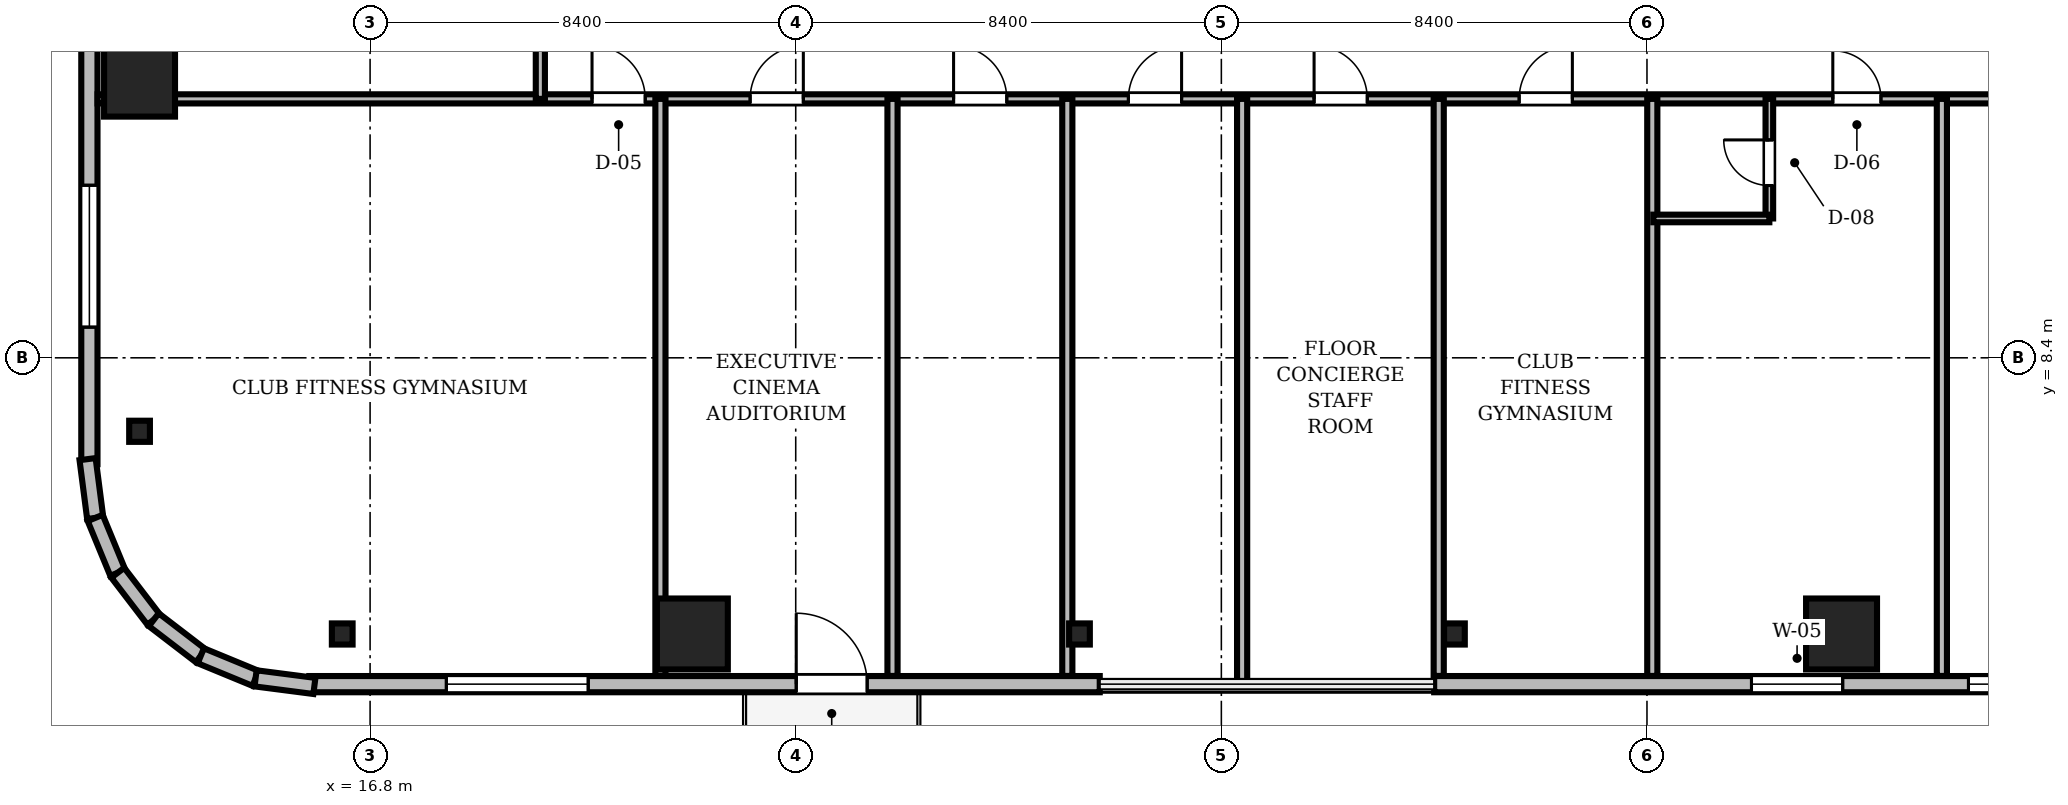
"""IFC4 building model, lengths in metres.
Left out: names, types, materials, properties, quantities, classifications, styles, units other than length and angle.
Written with IfcOpenShell. Run it as: python <this file> out.ifc"""

import sys

from ifc_helpers import new_model, si_unit, direction, frame, frame_2d, origin, origin_2d, place, context, subcontext, project, spatial, rectangle, i_section, extrude, source, transform, mapped, element, fill, save


model = new_model("IFC4")
c1 = context("Model", 3, precision=1e-05, world=origin(), true_north=direction((0.0, 1.0)))
c2 = subcontext(c1, "Body", "Model", "MODEL_VIEW")
j1 = project(units=[si_unit("LENGTHUNIT", "METRE"), si_unit("PLANEANGLEUNIT", "RADIAN")], contexts=[c1])
p1 = place(None, origin())
s1 = spatial("IfcSite", under=j1, at=p1, CompositionType="ELEMENT")
p2 = place(p1, origin())
s2 = spatial("IfcBuilding", under=s1, at=p2, CompositionType="ELEMENT")
p3 = place(p2, frame((0.0, 0.0, 181.0)))
s3 = spatial("IfcBuildingStorey", under=s2, at=p3, CompositionType="ELEMENT", Elevation=181.0)
m1 = source(origin(), c2, "Body", "SweptSolid", [
    extrude(rectangle(XDim=1.4, YDim=1.4, at=origin_2d()), origin(), (0.0, 0.0, 1.0), 3.58),
])
for number, where, z_axis, x_axis in (
    (1, (23.16, 2.95, 0.0), (0.0, 0.0, 1.0), (1.0, 0.0, 0.0)),
    (2, (45.84, 2.95, 0.0), (0.0, 0.0, 1.0), (1.0, 0.0, 0.0)),
    (3, (12.25, 13.86, 0.0), (0.0, 0.0, 1.0), (1.0, 0.0, 0.0)),
):
    element("IfcColumn", number, at=place(p3, frame(where, z_axis=z_axis, x_axis=x_axis)), inside=s3, PredefinedType="COLUMN", context=c2, shape_type="MappedRepresentation", body=[
        mapped(m1, transform((0.0, 0.0, 0.0), scale=1.0)),
    ])
m2 = source(origin(), c2, "Body", "SweptSolid", [
    extrude(i_section(OverallWidth=0.409, OverallDepth=0.417, WebThickness=0.021, FlangeThickness=0.033, FilletRadius=0.015, at=origin_2d()), origin(), (0.0, 0.0, 1.0), 3.58),
])
for number, where, z_axis, x_axis in (
    (4, (16.25, 2.95, 0.0), (0.0, 0.0, 1.0), (1.0, 0.0, 0.0)),
    (5, (30.8, 2.95, 0.0), (0.0, 0.0, 1.0), (1.0, 0.0, 0.0)),
    (6, (38.2, 2.95, 0.0), (0.0, 0.0, 1.0), (1.0, 0.0, 0.0)),
    (7, (12.25, 6.95, 0.0), (0.0, 0.0, 1.0), (1.0, 0.0, 0.0)),
):
    element("IfcColumn", number, at=place(p3, frame(where, z_axis=z_axis, x_axis=x_axis)), inside=s3, PredefinedType="COLUMN", context=c2, shape_type="MappedRepresentation", body=[
        mapped(m2, transform((0.0, 0.0, 0.0), scale=1.0)),
    ])
m3 = source(origin(), c2, "Body", "SweptSolid", [
    extrude(rectangle(XDim=15.6, YDim=0.32, at=frame_2d((7.8, 0.0))), origin(), (0.0, 0.0, 1.0), 3.58),
])
p4 = place(p3, frame((15.6, 1.96, 0.0), z_axis=(0.0, 0.0, 1.0), x_axis=(1.0, 0.0, 0.0)))
e8 = element("IfcWall", 8, at=p4, inside=s3, PredefinedType="SOLIDWALL", context=c2, shape_type="MappedRepresentation", body=[
    mapped(m3, transform((0.0, 0.0, 0.0), scale=1.0)),
])
m4 = source(origin(), c2, "Body", "SweptSolid", [
    extrude(rectangle(XDim=1.4, YDim=2.3, at=frame_2d((0.7, 1.15))), frame((0.0, 0.17, 0.0), z_axis=(0.0, -1.0, 0.0), x_axis=(1.0, 0.0, 0.0)), (0.0, 0.0, 1.0), 0.34),
])
p5 = place(p4, frame((9.61, 0.0, 0.0)))
e9 = element("IfcOpeningElement", 9, at=p5, cuts=e8, PredefinedType="OPENING", context=c2, shape_type="MappedRepresentation", body=[
    mapped(m4, transform((0.0, 0.0, 0.0), scale=1.0)),
])
m5 = source(origin(), c2, "Body", "SweptSolid", [
    extrude(rectangle(XDim=2.8, YDim=2.4, at=frame_2d((1.4, 1.2))), frame((0.0, 0.17, 0.0), z_axis=(0.0, -1.0, 0.0), x_axis=(1.0, 0.0, 0.0)), (0.0, 0.0, 1.0), 0.34),
])
p6 = place(p4, frame((2.705, 0.0, 0.72)))
e10 = element("IfcOpeningElement", 10, at=p6, cuts=e8, PredefinedType="OPENING", context=c2, shape_type="MappedRepresentation", body=[
    mapped(m5, transform((0.0, 0.0, 0.0), scale=1.0)),
])
p7 = place(p3, frame((37.8, 1.96, 0.0), z_axis=(0.0, 0.0, 1.0), x_axis=(1.0, 0.0, 0.0)))
e11 = element("IfcWall", 11, at=p7, inside=s3, PredefinedType="SOLIDWALL", context=c2, shape_type="MappedRepresentation", body=[
    mapped(m3, transform((0.0, 0.0, 0.0), scale=1.0)),
])
p8 = place(p7, frame((10.545, 0.0, 0.72)))
e12 = element("IfcOpeningElement", 12, at=p8, cuts=e11, PredefinedType="OPENING", context=c2, shape_type="MappedRepresentation", body=[
    mapped(m5, transform((0.0, 0.0, 0.0), scale=1.0)),
])
m6 = source(origin(), c2, "Body", "SweptSolid", [
    extrude(rectangle(XDim=1.8, YDim=2.4, at=frame_2d((0.9, 1.2))), frame((0.0, 0.17, 0.0), z_axis=(0.0, -1.0, 0.0), x_axis=(1.0, 0.0, 0.0)), (0.0, 0.0, 1.0), 0.34),
])
p9 = place(p7, frame((6.262, 0.0, 0.72)))
e13 = element("IfcOpeningElement", 13, at=p9, cuts=e11, PredefinedType="OPENING", context=c2, shape_type="MappedRepresentation", body=[
    mapped(m6, transform((0.0, 0.0, 0.0), scale=1.0)),
])
p10 = place(p3, frame((11.26, 21.9, 0.0), z_axis=(0.0, 0.0, 1.0), x_axis=(0.0, -1.0, 0.0)))
e14 = element("IfcWall", 14, at=p10, inside=s3, PredefinedType="SOLIDWALL", context=c2, shape_type="MappedRepresentation", body=[
    mapped(m3, transform((0.0, 0.0, 0.0), scale=1.0)),
])
p11 = place(p10, frame((10.095, 0.0, 0.72)))
e15 = element("IfcOpeningElement", 15, at=p11, cuts=e14, PredefinedType="OPENING", context=c2, shape_type="MappedRepresentation", body=[
    mapped(m5, transform((0.0, 0.0, 0.0), scale=1.0)),
])
m7 = source(origin(), c2, "Body", "SweptSolid", [
    extrude(rectangle(XDim=1.171, YDim=0.32, at=frame_2d((0.585, 0.0))), origin(), (0.0, 0.0, 1.0), 3.58),
])
p12 = place(p3, frame((11.224, 6.401, 0.0), z_axis=(0.0, 0.0, 1.0), x_axis=(0.128269133229, -0.991739395941, 0.0)))
e16 = element("IfcWall", 16, at=p12, inside=s3, PredefinedType="SOLIDWALL", context=c2, shape_type="MappedRepresentation", body=[
    mapped(m7, transform((0.0, 0.0, 0.0), scale=1.0)),
])
m8 = source(origin(), c2, "Body", "SweptSolid", [
    extrude(rectangle(XDim=1.169, YDim=0.32, at=frame_2d((0.584, 0.0))), origin(), (0.0, 0.0, 1.0), 3.58),
])
for number, where, z_axis, x_axis in (
    (17, (11.375, 5.24, 0.0), (0.0, 0.0, 1.0), (0.381, -0.925, 0.0)),
    (18, (11.82, 4.159, 0.0), (0.0, 0.0, 1.0), (0.608, -0.794, 0.0)),
):
    element("IfcWall", number, at=place(p3, frame(where, z_axis=z_axis, x_axis=x_axis)), inside=s3, PredefinedType="SOLIDWALL", context=c2, shape_type="MappedRepresentation", body=[
        mapped(m8, transform((0.0, 0.0, 0.0), scale=1.0)),
    ])
m9 = source(origin(), c2, "Body", "SweptSolid", [
    extrude(rectangle(XDim=1.169, YDim=0.32, at=frame_2d((0.584, 0.0))), origin(), (0.0, 0.0, 1.0), 3.58),
])
p13 = place(p3, frame((12.531, 3.231, 0.0), z_axis=(0.0, 0.0, 1.0), x_axis=(0.793663520347, -0.608356981114, 0.0)))
e19 = element("IfcWall", 19, at=p13, inside=s3, PredefinedType="SOLIDWALL", context=c2, shape_type="MappedRepresentation", body=[
    mapped(m9, transform((0.0, 0.0, 0.0), scale=1.0)),
])
m10 = source(origin(), c2, "Body", "SweptSolid", [
    extrude(rectangle(XDim=1.169, YDim=0.32, at=frame_2d((0.585, 0.0))), origin(), (0.0, 0.0, 1.0), 3.58),
])
p14 = place(p3, frame((13.459, 2.52, 0.0), z_axis=(0.0, 0.0, 1.0), x_axis=(0.924479075121, -0.381232789334, 0.0)))
e20 = element("IfcWall", 20, at=p14, inside=s3, PredefinedType="SOLIDWALL", context=c2, shape_type="MappedRepresentation", body=[
    mapped(m10, transform((0.0, 0.0, 0.0), scale=1.0)),
])
m11 = source(origin(), c2, "Body", "SweptSolid", [
    extrude(rectangle(XDim=1.17, YDim=0.32, at=frame_2d((0.585, 0.0))), origin(), (0.0, 0.0, 1.0), 3.58),
])
p15 = place(p3, frame((14.54, 2.074, 0.0), z_axis=(0.0, 0.0, 1.0), x_axis=(0.991762485493, -0.128090485085, 0.0)))
e21 = element("IfcWall", 21, at=p15, inside=s3, PredefinedType="SOLIDWALL", context=c2, shape_type="MappedRepresentation", body=[
    mapped(m11, transform((0.0, 0.0, 0.0), scale=1.0)),
])
m12 = source(origin(), c2, "Body", "SweptSolid", [
    extrude(rectangle(XDim=46.156, YDim=0.18, at=frame_2d((23.078, 0.0))), origin(), (0.0, 0.0, 1.0), 2.822),
])
p16 = place(p3, frame((11.422, 13.51, 0.0), z_axis=(0.0, 0.0, 1.0), x_axis=(1.0, 0.0, 0.0)))
e22 = element("IfcWall", 22, at=p16, inside=s3, PredefinedType="PARTITIONING", context=c2, shape_type="MappedRepresentation", body=[
    mapped(m12, transform((0.0, 0.0, 0.0), scale=1.0)),
])
m13 = source(origin(), c2, "Body", "SweptSolid", [
    extrude(rectangle(XDim=1.05, YDim=2.2, at=frame_2d((0.525, 1.1))), frame((0.0, 0.1, 0.0), z_axis=(0.0, -1.0, 0.0), x_axis=(1.0, 0.0, 0.0)), (0.0, 0.0, 1.0), 0.2),
])
p17 = place(p16, frame((9.758, 0.0, 0.0)))
e23 = element("IfcOpeningElement", 23, at=p17, cuts=e22, PredefinedType="OPENING", context=c2, shape_type="MappedRepresentation", body=[
    mapped(m13, transform((0.0, 0.0, 0.0), scale=1.0)),
])
p18 = place(p16, frame((12.878, 0.0, 0.0)))
e24 = element("IfcOpeningElement", 24, at=p18, cuts=e22, PredefinedType="OPENING", context=c2, shape_type="MappedRepresentation", body=[
    mapped(m13, transform((0.0, 0.0, 0.0), scale=1.0)),
])
p19 = place(p16, frame((16.893, 0.0, 0.0)))
e25 = element("IfcOpeningElement", 25, at=p19, cuts=e22, PredefinedType="OPENING", context=c2, shape_type="MappedRepresentation", body=[
    mapped(m13, transform((0.0, 0.0, 0.0), scale=1.0)),
])
p20 = place(p16, frame((20.344, 0.0, 0.0)))
e26 = element("IfcOpeningElement", 26, at=p20, cuts=e22, PredefinedType="OPENING", context=c2, shape_type="MappedRepresentation", body=[
    mapped(m13, transform((0.0, 0.0, 0.0), scale=1.0)),
])
p21 = place(p16, frame((24.008, 0.0, 0.0)))
e27 = element("IfcOpeningElement", 27, at=p21, cuts=e22, PredefinedType="OPENING", context=c2, shape_type="MappedRepresentation", body=[
    mapped(m13, transform((0.0, 0.0, 0.0), scale=1.0)),
])
p22 = place(p16, frame((28.055, 0.0, 0.0)))
e28 = element("IfcOpeningElement", 28, at=p22, cuts=e22, PredefinedType="OPENING", context=c2, shape_type="MappedRepresentation", body=[
    mapped(m13, transform((0.0, 0.0, 0.0), scale=1.0)),
])
m14 = source(origin(), c2, "Body", "SweptSolid", [
    extrude(rectangle(XDim=0.95, YDim=2.15, at=frame_2d((0.475, 1.075))), frame((0.0, 0.1, 0.0), z_axis=(0.0, -1.0, 0.0), x_axis=(1.0, 0.0, 0.0)), (0.0, 0.0, 1.0), 0.2),
])
p23 = place(p16, frame((34.246, 0.0, 0.0)))
e29 = element("IfcOpeningElement", 29, at=p23, cuts=e22, PredefinedType="OPENING", context=c2, shape_type="MappedRepresentation", body=[
    mapped(m14, transform((0.0, 0.0, 0.0), scale=1.0)),
])
p24 = place(p16, frame((37.498, 0.0, 0.0)))
e30 = element("IfcOpeningElement", 30, at=p24, cuts=e22, PredefinedType="OPENING", context=c2, shape_type="MappedRepresentation", body=[
    mapped(m13, transform((0.0, 0.0, 0.0), scale=1.0)),
])
m15 = source(origin(), c2, "Body", "SweptSolid", [
    extrude(rectangle(XDim=15.04, YDim=0.18, at=frame_2d((7.52, 0.0))), origin(), (0.0, 0.0, 1.0), 3.022),
])
p25 = place(p3, frame((20.16, 13.51, 0.0), z_axis=(0.0, 0.0, 1.0), x_axis=(0.0, 1.0, 0.0)))
e31 = element("IfcWall", 31, at=p25, inside=s3, PredefinedType="PARTITIONING", context=c2, shape_type="MappedRepresentation", body=[
    mapped(m15, transform((0.0, 0.0, 0.0), scale=1.0)),
])
p26 = place(p25, frame((3.202, 0.0, 0.0)))
e32 = element("IfcOpeningElement", 32, at=p26, cuts=e31, PredefinedType="OPENING", context=c2, shape_type="MappedRepresentation", body=[
    mapped(m13, transform((0.0, 0.0, 0.0), scale=1.0)),
])
p27 = place(p25, frame((11.873, 0.0, 0.0)))
e33 = element("IfcOpeningElement", 33, at=p27, cuts=e31, PredefinedType="OPENING", context=c2, shape_type="MappedRepresentation", body=[
    mapped(m14, transform((0.0, 0.0, 0.0), scale=1.0)),
])
m16 = source(origin(), c2, "Body", "SweptSolid", [
    extrude(rectangle(XDim=2.36, YDim=0.15, at=frame_2d((1.18, 0.0))), origin(), (0.0, 0.0, 1.0), 3.242),
])
p28 = place(p3, frame((44.415, 11.15, 0.0), z_axis=(0.0, 0.0, 1.0), x_axis=(0.0, 1.0, 0.0)))
e34 = element("IfcWall", 34, at=p28, inside=s3, PredefinedType="PARTITIONING", context=c2, shape_type="MappedRepresentation", body=[
    mapped(m16, transform((0.0, 0.0, 0.0), scale=1.0)),
])
m17 = source(origin(), c2, "Body", "SweptSolid", [
    extrude(rectangle(XDim=0.9, YDim=2.1, at=frame_2d((0.45, 1.05))), frame((0.0, 0.085, 0.0), z_axis=(0.0, -1.0, 0.0), x_axis=(1.0, 0.0, 0.0)), (0.0, 0.0, 1.0), 0.17),
])
p29 = place(p28, frame((0.65, 0.0, 0.0)))
e35 = element("IfcOpeningElement", 35, at=p29, cuts=e34, PredefinedType="OPENING", context=c2, shape_type="MappedRepresentation", body=[
    mapped(m17, transform((0.0, 0.0, 0.0), scale=1.0)),
])
m18 = source(origin(), c2, "Body", "SweptSolid", [
    extrude(rectangle(XDim=11.388, YDim=0.2, at=frame_2d((5.694, 0.0))), origin(), (0.0, 0.0, 1.0), 2.822),
])
for number, where, z_axis, x_axis in (
    (36, (22.53, 2.122, 0.0), (0.0, 0.0, 1.0), (0.0, 1.0, 0.0)),
    (37, (27.11, 2.122, 0.0), (0.0, 0.0, 1.0), (0.0, 1.0, 0.0)),
    (38, (30.56, 2.122, 0.0), (0.0, 0.0, 1.0), (0.0, 1.0, 0.0)),
):
    element("IfcWall", number, at=place(p3, frame(where, z_axis=z_axis, x_axis=x_axis)), inside=s3, PredefinedType="PARTITIONING", context=c2, shape_type="MappedRepresentation", body=[
        mapped(m18, transform((0.0, 0.0, 0.0), scale=1.0)),
    ])
m19 = source(origin(), c2, "Body", "SweptSolid", [
    extrude(rectangle(XDim=11.58, YDim=0.2, at=frame_2d((5.79, 0.0))), origin(), (0.0, 0.0, 1.0), 2.822),
])
p30 = place(p3, frame((34.01, 1.93, 0.0), z_axis=(0.0, 0.0, 1.0), x_axis=(0.0, 1.0, 0.0)))
e39 = element("IfcWall", 39, at=p30, inside=s3, PredefinedType="PARTITIONING", context=c2, shape_type="MappedRepresentation", body=[
    mapped(m19, transform((0.0, 0.0, 0.0), scale=1.0)),
])
for number, where, z_axis, x_axis in (
    (40, (37.89, 2.122, 0.0), (0.0, 0.0, 1.0), (0.0, 1.0, 0.0)),
    (41, (42.105, 2.122, 0.0), (0.0, 0.0, 1.0), (0.0, 1.0, 0.0)),
    (42, (47.82, 2.122, 0.0), (0.0, 0.0, 1.0), (0.0, 1.0, 0.0)),
):
    element("IfcWall", number, at=place(p3, frame(where, z_axis=z_axis, x_axis=x_axis)), inside=s3, PredefinedType="PARTITIONING", context=c2, shape_type="MappedRepresentation", body=[
        mapped(m18, transform((0.0, 0.0, 0.0), scale=1.0)),
    ])
m20 = source(origin(), c2, "Body", "SweptSolid", [
    extrude(rectangle(XDim=2.29, YDim=0.15, at=frame_2d((1.145, 0.0))), origin(), (0.0, 0.0, 1.0), 3.022),
])
p31 = place(p3, frame((42.125, 11.15, 0.0), z_axis=(0.0, 0.0, 1.0), x_axis=(1.0, 0.0, 0.0)))
e43 = element("IfcWall", 43, at=p31, inside=s3, PredefinedType="PARTITIONING", context=c2, shape_type="MappedRepresentation", body=[
    mapped(m20, transform((0.0, 0.0, 0.0), scale=1.0)),
])
m21 = source(origin(), c2, "Body", "SweptSolid", [
    extrude(rectangle(XDim=1.4, YDim=2.3, at=frame_2d((0.7, 1.15))), frame((0.0, 0.025, 0.0), z_axis=(0.0, -1.0, 0.0), x_axis=(1.0, 0.0, 0.0)), (0.0, 0.0, 1.0), 0.05),
])
p32 = place(p5, frame((1.4, 0.0, 0.0), z_axis=(0.0, 0.0, 1.0), x_axis=(-1.0, 0.0, 0.0)))
e44 = element("IfcDoor", 44, at=p32, inside=s3, OperationType="DOUBLE_DOOR_SLIDING", PredefinedType="DOOR", context=c2, shape_type="MappedRepresentation", body=[
    mapped(m21, transform((0.0, 0.0, 0.0), scale=1.0)),
])
fill(e9, e44)
m22 = source(origin(), c2, "Body", "SweptSolid", [
    extrude(rectangle(XDim=2.8, YDim=2.4, at=frame_2d((1.4, 1.2))), frame((0.0, 0.03, 0.0), z_axis=(0.0, -1.0, 0.0), x_axis=(1.0, 0.0, 0.0)), (0.0, 0.0, 1.0), 0.06),
])
p33 = place(p6, origin())
e45 = element("IfcWindow", 45, at=p33, inside=s3, PartitioningType="SINGLE_PANEL", PredefinedType="WINDOW", context=c2, shape_type="MappedRepresentation", body=[
    mapped(m22, transform((0.0, 0.0, 0.0), scale=1.0)),
])
fill(e10, e45)
p34 = place(p8, origin())
e46 = element("IfcWindow", 46, at=p34, inside=s3, PartitioningType="SINGLE_PANEL", PredefinedType="WINDOW", context=c2, shape_type="MappedRepresentation", body=[
    mapped(m22, transform((0.0, 0.0, 0.0), scale=1.0)),
])
fill(e12, e46)
p35 = place(p11, origin())
e47 = element("IfcWindow", 47, at=p35, inside=s3, PartitioningType="SINGLE_PANEL", PredefinedType="WINDOW", context=c2, shape_type="MappedRepresentation", body=[
    mapped(m22, transform((0.0, 0.0, 0.0), scale=1.0)),
])
fill(e15, e47)
m23 = source(origin(), c2, "Body", "SweptSolid", [
    extrude(rectangle(XDim=1.8, YDim=2.4, at=frame_2d((0.9, 1.2))), frame((0.0, 0.03, 0.0), z_axis=(0.0, -1.0, 0.0), x_axis=(1.0, 0.0, 0.0)), (0.0, 0.0, 1.0), 0.06),
])
p36 = place(p9, origin())
e48 = element("IfcWindow", 48, at=p36, inside=s3, PartitioningType="SINGLE_PANEL", PredefinedType="WINDOW", context=c2, shape_type="MappedRepresentation", body=[
    mapped(m23, transform((0.0, 0.0, 0.0), scale=1.0)),
])
fill(e13, e48)
m24 = source(origin(), c2, "Body", "SweptSolid", [
    extrude(rectangle(XDim=1.05, YDim=2.2, at=frame_2d((0.525, 1.1))), frame((0.0, 0.025, 0.0), z_axis=(0.0, -1.0, 0.0), x_axis=(1.0, 0.0, 0.0)), (0.0, 0.0, 1.0), 0.05),
])
p37 = place(p17, origin())
e49 = element("IfcDoor", 49, at=p37, inside=s3, OperationType="SINGLE_SWING_LEFT", PredefinedType="DOOR", context=c2, shape_type="MappedRepresentation", body=[
    mapped(m24, transform((0.0, 0.0, 0.0), scale=1.0)),
])
fill(e23, e49)
p38 = place(p18, origin())
e50 = element("IfcDoor", 50, at=p38, inside=s3, OperationType="SINGLE_SWING_RIGHT", PredefinedType="DOOR", context=c2, shape_type="MappedRepresentation", body=[
    mapped(m24, transform((0.0, 0.0, 0.0), scale=1.0)),
])
fill(e24, e50)
p39 = place(p19, origin())
e51 = element("IfcDoor", 51, at=p39, inside=s3, OperationType="SINGLE_SWING_LEFT", PredefinedType="DOOR", context=c2, shape_type="MappedRepresentation", body=[
    mapped(m24, transform((0.0, 0.0, 0.0), scale=1.0)),
])
fill(e25, e51)
p40 = place(p20, origin())
e52 = element("IfcDoor", 52, at=p40, inside=s3, OperationType="SINGLE_SWING_RIGHT", PredefinedType="DOOR", context=c2, shape_type="MappedRepresentation", body=[
    mapped(m24, transform((0.0, 0.0, 0.0), scale=1.0)),
])
fill(e26, e52)
p41 = place(p21, origin())
e53 = element("IfcDoor", 53, at=p41, inside=s3, OperationType="SINGLE_SWING_LEFT", PredefinedType="DOOR", context=c2, shape_type="MappedRepresentation", body=[
    mapped(m24, transform((0.0, 0.0, 0.0), scale=1.0)),
])
fill(e27, e53)
p42 = place(p22, origin())
e54 = element("IfcDoor", 54, at=p42, inside=s3, OperationType="SINGLE_SWING_RIGHT", PredefinedType="DOOR", context=c2, shape_type="MappedRepresentation", body=[
    mapped(m24, transform((0.0, 0.0, 0.0), scale=1.0)),
])
fill(e28, e54)
m25 = source(origin(), c2, "Body", "SweptSolid", [
    extrude(rectangle(XDim=0.95, YDim=2.15, at=frame_2d((0.475, 1.075))), frame((0.0, 0.025, 0.0), z_axis=(0.0, -1.0, 0.0), x_axis=(1.0, 0.0, 0.0)), (0.0, 0.0, 1.0), 0.05),
])
p43 = place(p23, origin())
e55 = element("IfcDoor", 55, at=p43, inside=s3, OperationType="SINGLE_SWING_LEFT", PredefinedType="DOOR", context=c2, shape_type="MappedRepresentation", body=[
    mapped(m25, transform((0.0, 0.0, 0.0), scale=1.0)),
])
fill(e29, e55)
m26 = source(origin(), c2, "Body", "SweptSolid", [
    extrude(rectangle(XDim=0.9, YDim=2.1, at=frame_2d((0.45, 1.05))), frame((0.0, 0.025, 0.0), z_axis=(0.0, -1.0, 0.0), x_axis=(1.0, 0.0, 0.0)), (0.0, 0.0, 1.0), 0.05),
])
p44 = place(p29, origin())
e56 = element("IfcDoor", 56, at=p44, inside=s3, OperationType="SINGLE_SWING_RIGHT", PredefinedType="DOOR", context=c2, shape_type="MappedRepresentation", body=[
    mapped(m26, transform((0.0, 0.0, 0.0), scale=1.0)),
])
fill(e35, e56)
save(model, sys.argv[1])
